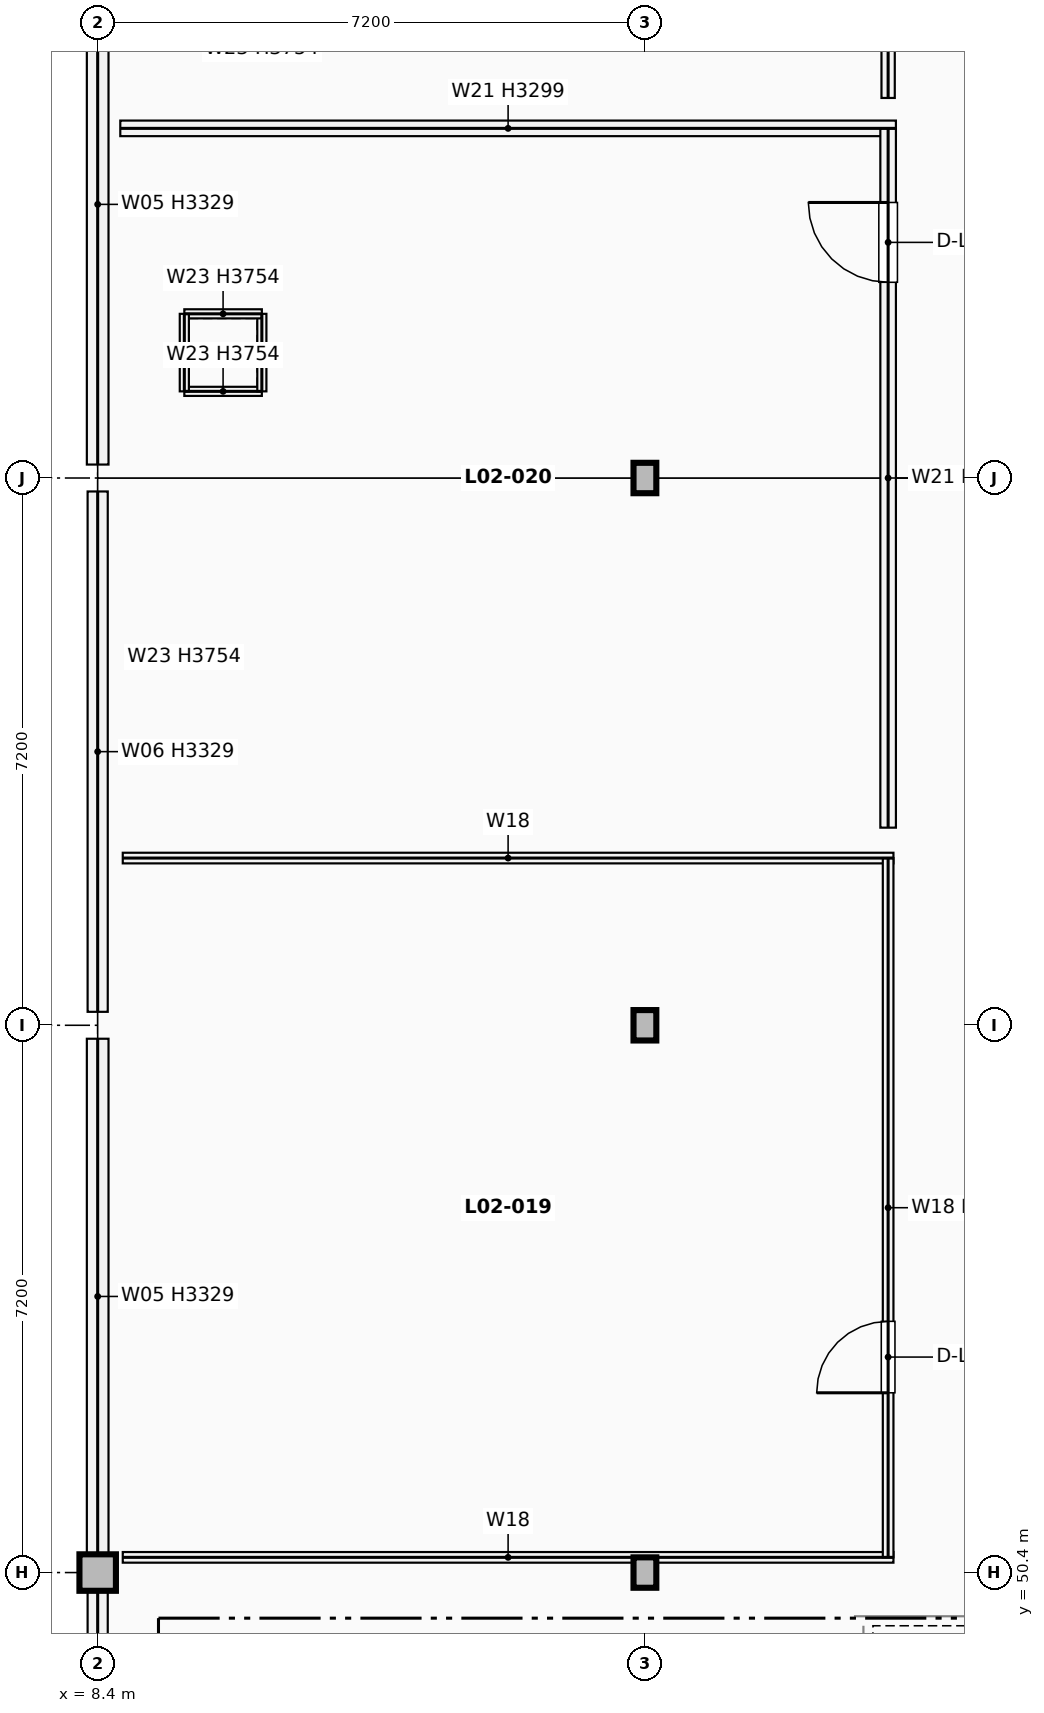
"""IFC4 building model, lengths in metres.
Left out: names, types, materials, properties, quantities, classifications, styles, units other than length and angle.
Written with IfcOpenShell. Run it as: python <this file> out.ifc"""

import sys

from ifc_helpers import new_model, si_unit, direction, frame, frame_2d, origin, origin_2d, place, context, subcontext, project, spatial, rectangle, i_section, extrude, element, fill, save


model = new_model("IFC4")
c1 = context("Model", 3, precision=1e-05, world=origin(), true_north=direction((0.0, 1.0)))
c2 = subcontext(c1, "Body", "Model", "MODEL_VIEW")
j1 = project(units=[si_unit("LENGTHUNIT", "METRE"), si_unit("PLANEANGLEUNIT", "RADIAN")], contexts=[c1])
p1 = place(None, origin())
s1 = spatial("IfcSite", under=j1, at=p1, CompositionType="ELEMENT")
p2 = place(p1, origin())
s2 = spatial("IfcBuilding", under=s1, at=p2, CompositionType="ELEMENT")
p3 = place(p2, frame((0.0, 0.0, 9.52)))
s3 = spatial("IfcBuildingStorey", under=s2, at=p3, CompositionType="ELEMENT", Elevation=9.52)
p4 = place(p3, frame((8.4, 50.4, 0.0), z_axis=(0.0, 0.0, 1.0), x_axis=(1.0, 0.0, 0.0)))
e1 = element("IfcColumn", 1, at=p4, inside=s3, PredefinedType="COLUMN", context=c2, shape_type="SweptSolid", body=[
    extrude(rectangle(XDim=0.48, YDim=0.48, at=origin_2d()), origin(), (0.0, 0.0, 1.0), 4.08),
])
for number, where, z_axis, x_axis in (
    (2, (15.6, 50.4, 0.0), (0.0, 0.0, 1.0), (1.0, 0.0, 0.0)),
    (3, (15.6, 57.6, 0.0), (0.0, 0.0, 1.0), (1.0, 0.0, 0.0)),
    (4, (15.6, 64.8, 0.0), (0.0, 0.0, 1.0), (1.0, 0.0, 0.0)),
):
    element("IfcColumn", number, at=place(p3, frame(where, z_axis=z_axis, x_axis=x_axis)), inside=s3, PredefinedType="COLUMN", context=c2, shape_type="SweptSolid", body=[
        extrude(i_section(OverallWidth=0.3, OverallDepth=0.4, WebThickness=0.013, FlangeThickness=0.024, at=origin_2d()), origin(), (0.0, 0.0, 1.0), 4.08),
    ])
p5 = place(p3, frame((8.4, 44.642, 0.0), z_axis=(0.0, 0.0, 1.0), x_axis=(0.0, 1.0, 0.0)))
e5 = element("IfcWall", 5, at=p5, inside=s3, PredefinedType="SOLIDWALL", context=c2, shape_type="SweptSolid", body=[
    extrude(rectangle(XDim=5.516, YDim=0.265, at=frame_2d((2.758, 0.0))), origin(), (0.0, 0.0, 1.0), 3.219),
])
p6 = place(p3, frame((8.4, 50.642, 0.0), z_axis=(0.0, 0.0, 1.0), x_axis=(0.0, 1.0, 0.0)))
e6 = element("IfcWall", 6, at=p6, inside=s3, PredefinedType="SOLIDWALL", context=c2, shape_type="SweptSolid", body=[
    extrude(rectangle(XDim=6.781, YDim=0.285, at=frame_2d((3.391, 0.0))), origin(), (0.0, 0.0, 1.0), 3.329),
])
p7 = place(p3, frame((8.4, 57.777, 0.0), z_axis=(0.0, 0.0, 1.0), x_axis=(0.0, 1.0, 0.0)))
e7 = element("IfcWall", 7, at=p7, inside=s3, PredefinedType="SOLIDWALL", context=c2, shape_type="SweptSolid", body=[
    extrude(rectangle(XDim=6.846, YDim=0.265, at=frame_2d((3.423, 0.0))), origin(), (0.0, 0.0, 1.0), 3.329),
])
p8 = place(p3, frame((8.4, 64.977, 0.0), z_axis=(0.0, 0.0, 1.0), x_axis=(0.0, 1.0, 0.0)))
e8 = element("IfcWall", 8, at=p8, inside=s3, PredefinedType="SOLIDWALL", context=c2, shape_type="SweptSolid", body=[
    extrude(rectangle(XDim=6.846, YDim=0.285, at=frame_2d((3.423, 0.0))), origin(), (0.0, 0.0, 1.0), 3.329),
])
for number, where, z_axis, x_axis in (
    (9, (9.54, 65.94, 0.0), (0.0, 0.0, 1.0), (1.0, 0.0, 0.0)),
    (10, (10.56, 65.94, 0.0), (0.0, 0.0, 1.0), (0.0, 1.0, 0.0)),
    (11, (10.56, 66.96, 0.0), (0.0, 0.0, 1.0), (-1.0, 0.0, 0.0)),
    (12, (9.54, 66.96, 0.0), (0.0, 0.0, 1.0), (0.0, -1.0, 0.0)),
):
    element("IfcWall", number, at=place(p3, frame(where, z_axis=z_axis, x_axis=x_axis)), inside=s3, PredefinedType="PARTITIONING", context=c2, shape_type="SweptSolid", body=[
        extrude(rectangle(XDim=1.02, YDim=0.12, at=frame_2d((0.51, 0.0))), origin(), (0.0, 0.0, 1.0), 3.754),
    ])
p9 = place(p3, frame((18.475, 48.1, 0.0), z_axis=(0.0, 0.0, 1.0), x_axis=(0.0, 1.0, 0.0)))
e13 = element("IfcWall", 13, at=p9, inside=s3, PredefinedType="SHEAR", context=c2, shape_type="SweptSolid", body=[
    extrude(rectangle(XDim=1.6, YDim=0.25, at=frame_2d((0.8, 0.0))), origin(), (0.0, 0.0, 1.0), 4.08),
])
p10 = place(p3, frame((18.35, 49.825, 0.0), z_axis=(0.0, 0.0, 1.0), x_axis=(1.0, 0.0, 0.0)))
e14 = element("IfcWall", 14, at=p10, inside=s3, PredefinedType="SHEAR", context=c2, shape_type="SweptSolid", body=[
    extrude(rectangle(XDim=3.1, YDim=0.25, at=frame_2d((1.55, 0.0))), origin(), (0.0, 0.0, 1.0), 4.08),
])
for number, where, z_axis, x_axis in (
    (15, (8.73, 50.6, 0.0), (0.0, 0.0, 1.0), (1.0, 0.0, 0.0)),
    (16, (8.73, 59.8, 0.0), (0.0, 0.0, 1.0), (1.0, 0.0, 0.0)),
):
    element("IfcWall", number, at=place(p3, frame(where, z_axis=z_axis, x_axis=x_axis)), inside=s3, PredefinedType="PARTITIONING", context=c2, shape_type="SweptSolid", body=[
        extrude(rectangle(XDim=10.14, YDim=0.14, at=frame_2d((5.07, 0.0))), origin(), (0.0, 0.0, 1.0), 3.299),
    ])
p11 = place(p3, frame((18.8, 50.6, 0.0), z_axis=(0.0, 0.0, 1.0), x_axis=(0.0, 1.0, 0.0)))
e17 = element("IfcWall", 17, at=p11, inside=s3, PredefinedType="PARTITIONING", context=c2, shape_type="SweptSolid", body=[
    extrude(rectangle(XDim=9.2, YDim=0.14, at=frame_2d((4.6, 0.0))), origin(), (0.0, 0.0, 1.0), 3.329),
])
p12 = place(p11, frame((2.165, 0.0, 0.0)))
e18 = element("IfcOpeningElement", 18, at=p12, cuts=e17, PredefinedType="OPENING", context=c2, shape_type="SweptSolid", body=[
    extrude(rectangle(XDim=0.94, YDim=2.1, at=frame_2d((0.47, 1.05))), frame((0.0, 0.08, 0.0), z_axis=(0.0, -1.0, 0.0), x_axis=(1.0, 0.0, 0.0)), (0.0, 0.0, 1.0), 0.16),
])
p13 = place(p3, frame((8.698, 69.4, 0.0), z_axis=(0.0, 0.0, 1.0), x_axis=(1.0, 0.0, 0.0)))
e19 = element("IfcWall", 19, at=p13, inside=s3, PredefinedType="PARTITIONING", context=c2, shape_type="SweptSolid", body=[
    extrude(rectangle(XDim=10.205, YDim=0.205, at=frame_2d((5.103, 0.0))), origin(), (0.0, 0.0, 1.0), 3.299),
])
p14 = place(p3, frame((18.8, 60.2, 0.0), z_axis=(0.0, 0.0, 1.0), x_axis=(0.0, 1.0, 0.0)))
e20 = element("IfcWall", 20, at=p14, inside=s3, PredefinedType="PARTITIONING", context=c2, shape_type="SweptSolid", body=[
    extrude(rectangle(XDim=9.2, YDim=0.205, at=frame_2d((4.6, 0.0))), origin(), (0.0, 0.0, 1.0), 3.329),
])
p15 = place(p14, frame((7.175, 0.0, 0.0)))
e21 = element("IfcOpeningElement", 21, at=p15, cuts=e20, PredefinedType="OPENING", context=c2, shape_type="SweptSolid", body=[
    extrude(rectangle(XDim=1.05, YDim=2.15, at=frame_2d((0.525, 1.075))), frame((0.0, 0.113, 0.0), z_axis=(0.0, -1.0, 0.0), x_axis=(1.0, 0.0, 0.0)), (0.0, 0.0, 1.0), 0.225),
])
p16 = place(p3, frame((18.8, 69.8, 0.0), z_axis=(0.0, 0.0, 1.0), x_axis=(0.0, 1.0, 0.0)))
e22 = element("IfcWall", 22, at=p16, inside=s3, PredefinedType="PARTITIONING", context=c2, shape_type="SweptSolid", body=[
    extrude(rectangle(XDim=9.0, YDim=0.175, at=frame_2d((4.5, 0.0))), origin(), (0.0, 0.0, 1.0), 3.329),
])
p17 = place(p16, frame((5.72, 0.0, 0.0)))
e23 = element("IfcOpeningElement", 23, at=p17, cuts=e22, PredefinedType="OPENING", context=c2, shape_type="SweptSolid", body=[
    extrude(rectangle(XDim=1.24, YDim=2.2, at=frame_2d((0.62, 1.1))), frame((0.0, 0.098, 0.0), z_axis=(0.0, -1.0, 0.0), x_axis=(1.0, 0.0, 0.0)), (0.0, 0.0, 1.0), 0.195),
])
p18 = place(p12, origin())
e24 = element("IfcDoor", 24, at=p18, inside=s3, OperationType="SINGLE_SWING_LEFT", PredefinedType="DOOR", context=c2, shape_type="SweptSolid", body=[
    extrude(rectangle(XDim=0.94, YDim=2.1, at=frame_2d((0.47, 1.05))), frame((0.0, 0.025, 0.0), z_axis=(0.0, -1.0, 0.0), x_axis=(1.0, 0.0, 0.0)), (0.0, 0.0, 1.0), 0.05),
])
fill(e18, e24)
p19 = place(p15, origin())
e25 = element("IfcDoor", 25, at=p19, inside=s3, OperationType="SINGLE_SWING_RIGHT", PredefinedType="DOOR", context=c2, shape_type="SweptSolid", body=[
    extrude(rectangle(XDim=1.05, YDim=2.15, at=frame_2d((0.525, 1.075))), frame((0.0, 0.025, 0.0), z_axis=(0.0, -1.0, 0.0), x_axis=(1.0, 0.0, 0.0)), (0.0, 0.0, 1.0), 0.05),
])
fill(e21, e25)
save(model, sys.argv[1])
